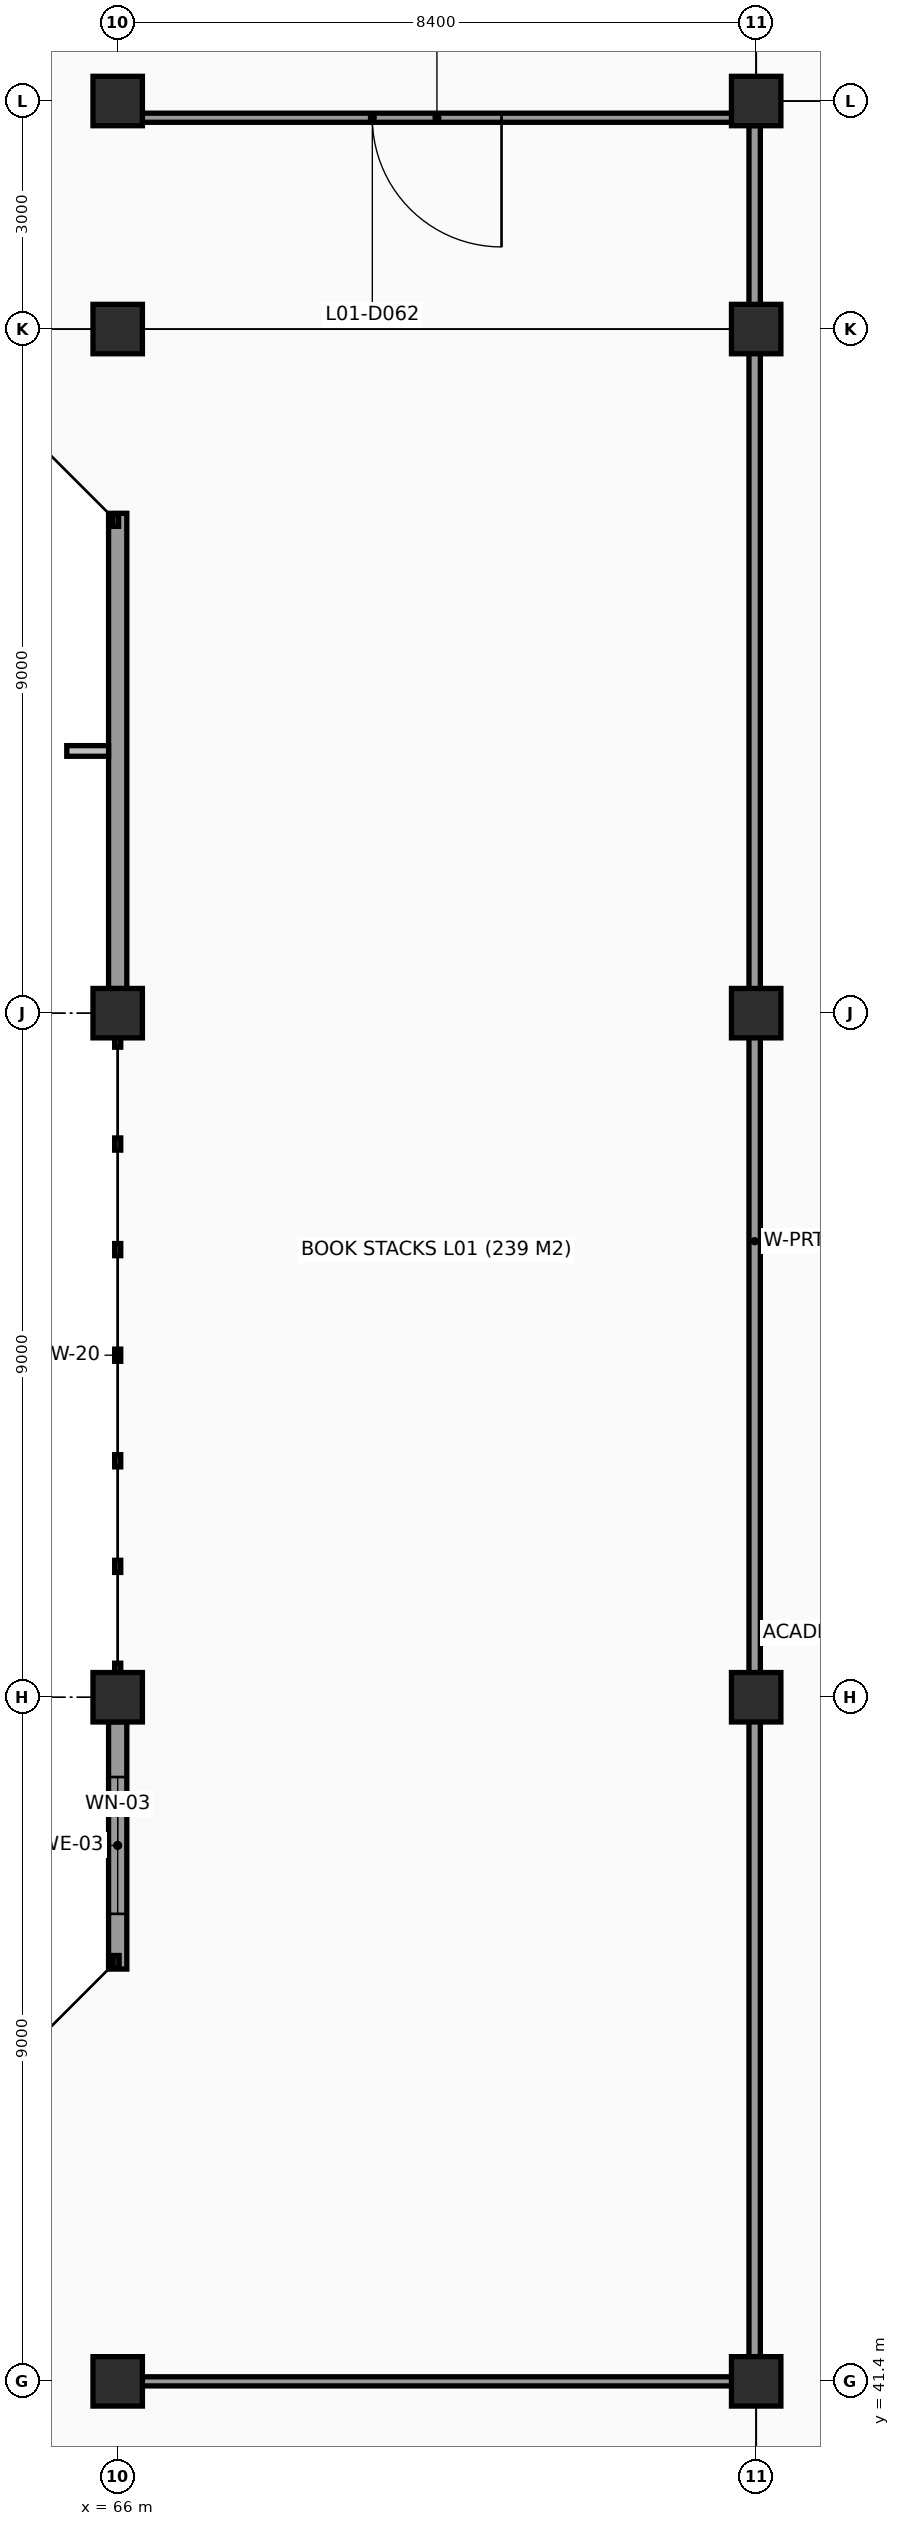
"""IFC4 building model, lengths in metres.
Left out: names, types, materials, properties, quantities, classifications, styles, units other than length and angle.
Written with IfcOpenShell. Run it as: python <this file> out.ifc"""

import sys

from ifc_helpers import new_model, si_unit, direction, frame, frame_2d, origin, origin_2d, place, context, subcontext, project, spatial, rectangle, extrude, element, fill, save


model = new_model("IFC4")
c1 = context("Model", 3, precision=1e-05, world=origin(), true_north=direction((0.0, 1.0)))
c2 = subcontext(c1, "Body", "Model", "MODEL_VIEW")
j1 = project(units=[si_unit("LENGTHUNIT", "METRE"), si_unit("PLANEANGLEUNIT", "RADIAN")], contexts=[c1])
p1 = place(None, origin())
s1 = spatial("IfcSite", under=j1, at=p1, CompositionType="ELEMENT")
p2 = place(p1, origin())
s2 = spatial("IfcBuilding", under=s1, at=p2, CompositionType="ELEMENT")
p3 = place(p2, frame((0.0, 0.0, 4.2)))
s3 = spatial("IfcBuildingStorey", under=s2, at=p3, CompositionType="ELEMENT", Elevation=4.2)
for number, where, z_axis, x_axis in (
    (1, (66.0, 41.4, 0.0), (0.0, 0.0, 1.0), (1.0, 0.0, 0.0)),
    (2, (66.0, 50.4, 0.0), (0.0, 0.0, 1.0), (1.0, 0.0, 0.0)),
    (3, (66.0, 59.4, 0.0), (0.0, 0.0, 1.0), (1.0, 0.0, 0.0)),
    (4, (66.0, 68.4, 0.0), (0.0, 0.0, 1.0), (1.0, 0.0, 0.0)),
    (5, (66.0, 71.4, 0.0), (0.0, 0.0, 1.0), (1.0, 0.0, 0.0)),
    (6, (74.4, 41.4, 0.0), (0.0, 0.0, 1.0), (1.0, 0.0, 0.0)),
    (7, (74.4, 50.4, 0.0), (0.0, 0.0, 1.0), (1.0, 0.0, 0.0)),
    (8, (74.4, 59.4, 0.0), (0.0, 0.0, 1.0), (1.0, 0.0, 0.0)),
    (9, (74.4, 68.4, 0.0), (0.0, 0.0, 1.0), (1.0, 0.0, 0.0)),
    (10, (74.4, 71.4, 0.0), (0.0, 0.0, 1.0), (1.0, 0.0, 0.0)),
):
    element("IfcColumn", number, at=place(p3, frame(where, z_axis=z_axis, x_axis=x_axis)), inside=s3, PredefinedType="COLUMN", context=c2, shape_type="SweptSolid", body=[
        extrude(rectangle(XDim=0.65, YDim=0.65, at=origin_2d()), origin(), (0.0, 0.0, 1.0), 3.6),
    ])
p4 = place(p3, frame((66.0, 46.824, 0.0), z_axis=(0.0, 0.0, 1.0), x_axis=(0.0, 1.0, 0.0)))
e11 = element("IfcWall", 11, at=p4, inside=s3, PredefinedType="SOLIDWALL", context=c2, shape_type="SweptSolid", body=[
    extrude(rectangle(XDim=3.253, YDim=0.24, at=frame_2d((1.626, 0.0))), origin(), (0.0, 0.0, 1.0), 2.94),
])
p5 = place(p4, frame((0.727, 0.0, 0.95)))
e12 = element("IfcOpeningElement", 12, at=p5, cuts=e11, PredefinedType="OPENING", context=c2, shape_type="SweptSolid", body=[
    extrude(rectangle(XDim=1.8, YDim=1.2, at=frame_2d((0.9, 0.6))), frame((0.0, 0.13, 0.0), z_axis=(0.0, -1.0, 0.0), x_axis=(1.0, 0.0, 0.0)), (0.0, 0.0, 1.0), 0.26),
])
p6 = place(p3, frame((66.0, 59.723, 0.0), z_axis=(0.0, 0.0, 1.0), x_axis=(0.0, 1.0, 0.0)))
e13 = element("IfcWall", 13, at=p6, inside=s3, PredefinedType="SOLIDWALL", context=c2, shape_type="SweptSolid", body=[
    extrude(rectangle(XDim=6.253, YDim=0.24, at=frame_2d((3.126, 0.0))), origin(), (0.0, 0.0, 1.0), 2.6),
])
p7 = place(p3, frame((66.323, 71.18, 0.0), z_axis=(0.0, 0.0, 1.0), x_axis=(1.0, 0.0, 0.0)))
e14 = element("IfcWall", 14, at=p7, inside=s3, PredefinedType="PARTITIONING", context=c2, shape_type="SweptSolid", body=[
    extrude(rectangle(XDim=7.754, YDim=0.12, at=frame_2d((3.877, 0.0))), origin(), (0.0, 0.0, 1.0), 2.5),
])
p8 = place(p7, frame((3.027, 0.0, 0.0)))
e15 = element("IfcOpeningElement", 15, at=p8, cuts=e14, PredefinedType="OPENING", context=c2, shape_type="SweptSolid", body=[
    extrude(rectangle(XDim=1.7, YDim=2.2, at=frame_2d((0.85, 1.1))), frame((0.0, 0.07, 0.0), z_axis=(0.0, -1.0, 0.0), x_axis=(1.0, 0.0, 0.0)), (0.0, 0.0, 1.0), 0.14),
])
p9 = place(p3, frame((74.38, 71.077, 0.0), z_axis=(0.0, 0.0, 1.0), x_axis=(0.0, -1.0, 0.0)))
e16 = element("IfcWall", 16, at=p9, inside=s3, PredefinedType="PARTITIONING", context=c2, shape_type="SweptSolid", body=[
    extrude(rectangle(XDim=29.354, YDim=0.15, at=frame_2d((14.677, 0.0))), origin(), (0.0, 0.0, 1.0), 2.65),
])
p10 = place(p3, frame((74.077, 41.4, 0.0), z_axis=(0.0, 0.0, 1.0), x_axis=(-1.0, 0.0, 0.0)))
e17 = element("IfcWall", 17, at=p10, inside=s3, PredefinedType="PARTITIONING", context=c2, shape_type="SweptSolid", body=[
    extrude(rectangle(XDim=7.754, YDim=0.12, at=frame_2d((3.877, 0.0))), origin(), (0.0, 0.0, 1.0), 2.85),
])
p11 = place(p5, origin())
e18 = element("IfcWindow", 18, at=p11, inside=s3, PartitioningType="SINGLE_PANEL", PredefinedType="WINDOW", context=c2, shape_type="SweptSolid", body=[
    extrude(rectangle(XDim=1.8, YDim=1.2, at=frame_2d((0.9, 0.6))), frame((0.0, 0.03, 0.0), z_axis=(0.0, -1.0, 0.0), x_axis=(1.0, 0.0, 0.0)), (0.0, 0.0, 1.0), 0.06),
])
fill(e12, e18)
p12 = place(p8, origin())
e19 = element("IfcDoor", 19, at=p12, inside=s3, OperationType="DOUBLE_DOOR_SINGLE_SWING", PredefinedType="DOOR", context=c2, shape_type="SweptSolid", body=[
    extrude(rectangle(XDim=1.7, YDim=2.2, at=frame_2d((0.85, 1.1))), frame((0.0, 0.025, 0.0), z_axis=(0.0, -1.0, 0.0), x_axis=(1.0, 0.0, 0.0)), (0.0, 0.0, 1.0), 0.05),
])
fill(e15, e19)
save(model, sys.argv[1])
